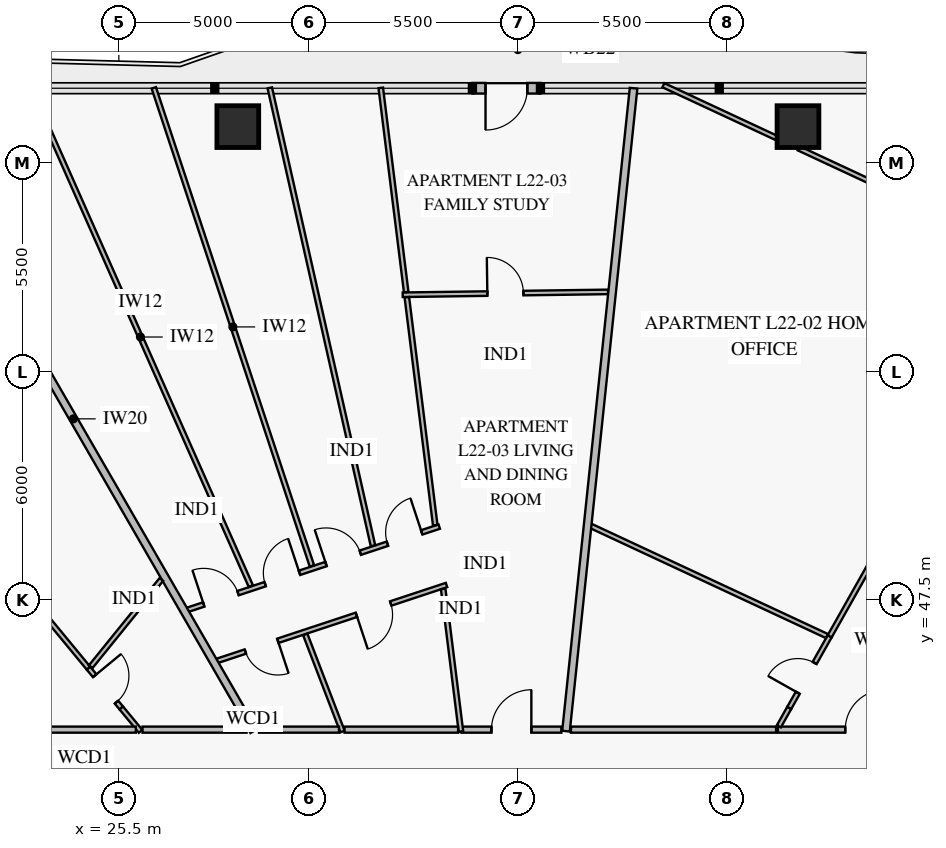
"""IFC4 building model, lengths in metres.
Left out: names, types, materials, properties, quantities, classifications, styles, units other than length and angle.
Written with IfcOpenShell. Run it as: python <this file> out.ifc"""

import sys

from ifc_helpers import new_model, si_unit, direction, frame, frame_2d, origin, origin_2d, place, context, subcontext, project, spatial, rectangle, extrude, element, fill, save


model = new_model("IFC4")
c1 = context("Model", 3, precision=1e-05, world=origin(), true_north=direction((0.0, 1.0)))
c2 = subcontext(c1, "Body", "Model", "MODEL_VIEW")
j1 = project(units=[si_unit("LENGTHUNIT", "METRE"), si_unit("PLANEANGLEUNIT", "RADIAN")], contexts=[c1])
p1 = place(None, origin())
s1 = spatial("IfcSite", under=j1, at=p1, CompositionType="ELEMENT")
p2 = place(p1, origin())
s2 = spatial("IfcBuilding", under=s1, at=p2, CompositionType="ELEMENT")
p3 = place(p2, frame((0.0, 0.0, 92.4)))
s3 = spatial("IfcBuildingStorey", under=s2, at=p3, CompositionType="ELEMENT", Elevation=92.4)
for number, where, z_axis, x_axis in (
    (1, (43.37, 59.948, 0.0), (0.0, 0.0, 1.0), (-1.0, 0.0, 0.0)),
    (2, (28.63, 59.948, 0.0), (0.0, 0.0, 1.0), (-1.0, 0.0, 0.0)),
):
    element("IfcColumn", number, at=place(p3, frame(where, z_axis=z_axis, x_axis=x_axis)), inside=s3, PredefinedType="COLUMN", context=c2, shape_type="SweptSolid", body=[
        extrude(rectangle(XDim=1.1, YDim=1.1, at=origin_2d()), origin(), (0.0, 0.0, 1.0), 3.55),
    ])
p4 = place(p3, frame((34.803, 60.958, 0.0), z_axis=(0.0, 0.0, 1.0), x_axis=(1.0, 0.0, 0.0)))
e3 = element("IfcWall", 3, at=p4, inside=s3, PredefinedType="SOLIDWALL", context=c2, shape_type="SweptSolid", body=[
    extrude(rectangle(XDim=1.79, YDim=0.28, at=frame_2d((0.895, 0.0))), origin(), (0.0, 0.0, 1.0), 3.55),
])
p5 = place(p4, frame((0.345, 0.0, 0.0)))
e4 = element("IfcOpeningElement", 4, at=p5, cuts=e3, PredefinedType="OPENING", context=c2, shape_type="SweptSolid", body=[
    extrude(rectangle(XDim=1.1, YDim=2.2, at=frame_2d((0.55, 1.1))), frame((0.0, 0.152, 0.0), z_axis=(0.0, -1.0, 0.0), x_axis=(1.0, 0.0, 0.0)), (0.0, 0.0, 1.0), 0.304),
])
p6 = place(p3, frame((43.139, 44.65, 0.0), z_axis=(0.0, 0.0, 1.0), x_axis=(0.491544748093, 0.870852318492, 0.0)))
e5 = element("IfcWall", 5, at=p6, inside=s3, PredefinedType="PARTITIONING", context=c2, shape_type="SweptSolid", body=[
    extrude(rectangle(XDim=2.167, YDim=0.12, at=frame_2d((1.083, 0.0))), origin(), (0.0, 0.0, 1.0), 3.55),
])
p7 = place(p6, frame((0.46, 0.0, 0.0)))
e6 = element("IfcOpeningElement", 6, at=p7, cuts=e5, PredefinedType="OPENING", context=c2, shape_type="SweptSolid", body=[
    extrude(rectangle(XDim=0.9, YDim=2.1, at=frame_2d((0.45, 1.05))), frame((0.0, 0.072, 0.0), z_axis=(0.0, -1.0, 0.0), x_axis=(1.0, 0.0, 0.0)), (0.0, 0.0, 1.0), 0.144),
])
p8 = place(p3, frame((44.204, 46.537, 0.0), z_axis=(0.0, 0.0, 1.0), x_axis=(0.491507930141, 0.870873099027, 0.0)))
e7 = element("IfcWall", 7, at=p8, inside=s3, PredefinedType="PARTITIONING", context=c2, shape_type="SweptSolid", body=[
    extrude(rectangle(XDim=10.019, YDim=0.12, at=frame_2d((5.009, 0.0))), origin(), (0.0, 0.0, 1.0), 3.1),
])
p9 = place(p8, frame((5.176, 0.0, 0.0)))
e8 = element("IfcOpeningElement", 8, at=p9, cuts=e7, PredefinedType="OPENING", context=c2, shape_type="SweptSolid", body=[
    extrude(rectangle(XDim=0.95, YDim=2.1, at=frame_2d((0.475, 1.05))), frame((0.0, 0.072, 0.0), z_axis=(0.0, -1.0, 0.0), x_axis=(1.0, 0.0, 0.0)), (0.0, 0.0, 1.0), 0.144),
])
p10 = place(p3, frame((49.71, 56.43, 0.0), z_axis=(0.0, 0.0, 1.0), x_axis=(-0.906320781417, 0.422590394084, 0.0)))
e9 = element("IfcWall", 9, at=p10, inside=s3, PredefinedType="PARTITIONING", context=c2, shape_type="SweptSolid", body=[
    extrude(rectangle(XDim=6.976, YDim=0.12, at=frame_2d((3.488, 0.0))), origin(), (0.0, 0.0, 1.0), 2.8),
])
p11 = place(p10, frame((2.929, 0.0, 0.0)))
e10 = element("IfcOpeningElement", 10, at=p11, cuts=e9, PredefinedType="OPENING", context=c2, shape_type="SweptSolid", body=[
    extrude(rectangle(XDim=0.95, YDim=2.1, at=frame_2d((0.475, 1.05))), frame((0.0, 0.072, 0.0), z_axis=(0.0, -1.0, 0.0), x_axis=(1.0, 0.0, 0.0)), (0.0, 0.0, 1.0), 0.144),
])
p12 = place(p3, frame((47.436, 44.08, 0.0), z_axis=(0.0, 0.0, 1.0), x_axis=(-1.0, 0.0, 0.0)))
e11 = element("IfcWall", 11, at=p12, inside=s3, PredefinedType="PARTITIONING", context=c2, shape_type="SweptSolid", body=[
    extrude(rectangle(XDim=4.595, YDim=0.16, at=frame_2d((2.297, 0.0))), origin(), (0.0, 0.0, 1.0), 3.55),
])
p13 = place(p12, frame((1.772, 0.0, 0.0)))
e12 = element("IfcOpeningElement", 12, at=p13, cuts=e11, PredefinedType="OPENING", context=c2, shape_type="SweptSolid", body=[
    extrude(rectangle(XDim=1.05, YDim=2.15, at=frame_2d((0.525, 1.075))), frame((0.0, 0.092, 0.0), z_axis=(0.0, -1.0, 0.0), x_axis=(1.0, 0.0, 0.0)), (0.0, 0.0, 1.0), 0.184),
])
p14 = place(p3, frame((38.373, 55.6, 0.0), z_axis=(0.0, 0.0, 1.0), x_axis=(-0.999902567538, -0.01395906268, 0.0)))
e13 = element("IfcWall", 13, at=p14, inside=s3, PredefinedType="PARTITIONING", context=c2, shape_type="SweptSolid", body=[
    extrude(rectangle(XDim=5.404, YDim=0.12, at=frame_2d((2.702, 0.0))), origin(), (0.0, 0.0, 1.0), 3.55),
])
p15 = place(p14, frame((2.227, 0.0, 0.0)))
e14 = element("IfcOpeningElement", 14, at=p15, cuts=e13, PredefinedType="OPENING", context=c2, shape_type="SweptSolid", body=[
    extrude(rectangle(XDim=0.95, YDim=2.1, at=frame_2d((0.475, 1.05))), frame((0.0, 0.072, 0.0), z_axis=(0.0, -1.0, 0.0), x_axis=(1.0, 0.0, 0.0)), (0.0, 0.0, 1.0), 0.144),
])
p16 = place(p3, frame((34.122, 47.885, 0.0), z_axis=(0.0, 0.0, 1.0), x_axis=(-0.949423400421, -0.313998736834, 0.0)))
e15 = element("IfcWall", 15, at=p16, inside=s3, PredefinedType="PARTITIONING", context=c2, shape_type="SweptSolid", body=[
    extrude(rectangle(XDim=6.41, YDim=0.12, at=frame_2d((3.205, 0.0))), origin(), (0.0, 0.0, 1.0), 2.85),
])
p17 = place(p16, frame((1.546, 0.0, 0.0)))
e16 = element("IfcOpeningElement", 16, at=p17, cuts=e15, PredefinedType="OPENING", context=c2, shape_type="SweptSolid", body=[
    extrude(rectangle(XDim=0.95, YDim=2.1, at=frame_2d((0.475, 1.05))), frame((0.0, 0.072, 0.0), z_axis=(0.0, -1.0, 0.0), x_axis=(1.0, 0.0, 0.0)), (0.0, 0.0, 1.0), 0.144),
])
p18 = place(p16, frame((4.674, 0.0, 0.0)))
e17 = element("IfcOpeningElement", 17, at=p18, cuts=e15, PredefinedType="OPENING", context=c2, shape_type="SweptSolid", body=[
    extrude(rectangle(XDim=0.9, YDim=2.1, at=frame_2d((0.45, 1.05))), frame((0.0, 0.072, 0.0), z_axis=(0.0, -1.0, 0.0), x_axis=(1.0, 0.0, 0.0)), (0.0, 0.0, 1.0), 0.144),
])
p19 = place(p3, frame((33.931, 49.423, 0.0), z_axis=(0.0, 0.0, 1.0), x_axis=(-0.949429209045, -0.313981173023, 0.0)))
e18 = element("IfcWall", 18, at=p19, inside=s3, PredefinedType="PARTITIONING", context=c2, shape_type="SweptSolid", body=[
    extrude(rectangle(XDim=7.012, YDim=0.12, at=frame_2d((3.506, 0.0))), origin(), (0.0, 0.0, 1.0), 2.85),
])
p20 = place(p19, frame((0.485, 0.0, 0.0)))
e19 = element("IfcOpeningElement", 19, at=p20, cuts=e18, PredefinedType="OPENING", context=c2, shape_type="SweptSolid", body=[
    extrude(rectangle(XDim=0.95, YDim=2.1, at=frame_2d((0.475, 1.05))), frame((0.0, 0.072, 0.0), z_axis=(0.0, -1.0, 0.0), x_axis=(1.0, 0.0, 0.0)), (0.0, 0.0, 1.0), 0.144),
])
p21 = place(p19, frame((2.188, 0.0, 0.0)))
e20 = element("IfcOpeningElement", 20, at=p21, cuts=e18, PredefinedType="OPENING", context=c2, shape_type="SweptSolid", body=[
    extrude(rectangle(XDim=0.95, YDim=2.1, at=frame_2d((0.475, 1.05))), frame((0.0, 0.072, 0.0), z_axis=(0.0, -1.0, 0.0), x_axis=(1.0, 0.0, 0.0)), (0.0, 0.0, 1.0), 0.144),
])
p22 = place(p19, frame((3.874, 0.0, 0.0)))
e21 = element("IfcOpeningElement", 21, at=p22, cuts=e18, PredefinedType="OPENING", context=c2, shape_type="SweptSolid", body=[
    extrude(rectangle(XDim=0.95, YDim=2.1, at=frame_2d((0.475, 1.05))), frame((0.0, 0.072, 0.0), z_axis=(0.0, -1.0, 0.0), x_axis=(1.0, 0.0, 0.0)), (0.0, 0.0, 1.0), 0.144),
])
p23 = place(p19, frame((5.577, 0.0, 0.0)))
e22 = element("IfcOpeningElement", 22, at=p23, cuts=e18, PredefinedType="OPENING", context=c2, shape_type="SweptSolid", body=[
    extrude(rectangle(XDim=0.95, YDim=2.1, at=frame_2d((0.475, 1.05))), frame((0.0, 0.072, 0.0), z_axis=(0.0, -1.0, 0.0), x_axis=(1.0, 0.0, 0.0)), (0.0, 0.0, 1.0), 0.144),
])
p24 = place(p3, frame((37.143, 44.08, 0.0), z_axis=(0.0, 0.0, 1.0), x_axis=(-1.0, 0.0, 0.0)))
e23 = element("IfcWall", 23, at=p24, inside=s3, PredefinedType="PARTITIONING", context=c2, shape_type="SweptSolid", body=[
    extrude(rectangle(XDim=2.628, YDim=0.16, at=frame_2d((1.314, 0.0))), origin(), (0.0, 0.0, 1.0), 3.55),
])
p25 = place(p24, frame((0.789, 0.0, 0.0)))
e24 = element("IfcOpeningElement", 24, at=p25, cuts=e23, PredefinedType="OPENING", context=c2, shape_type="SweptSolid", body=[
    extrude(rectangle(XDim=1.05, YDim=2.15, at=frame_2d((0.525, 1.075))), frame((0.0, 0.092, 0.0), z_axis=(0.0, -1.0, 0.0), x_axis=(1.0, 0.0, 0.0)), (0.0, 0.0, 1.0), 0.184),
])
p26 = place(p3, frame((25.565, 44.65, 0.0), z_axis=(0.0, 0.0, 1.0), x_axis=(-0.636278938951, 0.771459079827, 0.0)))
e25 = element("IfcWall", 25, at=p26, inside=s3, PredefinedType="PARTITIONING", context=c2, shape_type="SweptSolid", body=[
    extrude(rectangle(XDim=1.362, YDim=0.12, at=frame_2d((0.681, 0.0))), origin(), (0.0, 0.0, 1.0), 3.55),
])
p27 = place(p26, frame((0.2, 0.0, 0.0)))
e26 = element("IfcOpeningElement", 26, at=p27, cuts=e25, PredefinedType="OPENING", context=c2, shape_type="SweptSolid", body=[
    extrude(rectangle(XDim=0.9, YDim=2.1, at=frame_2d((0.45, 1.05))), frame((0.0, 0.072, 0.0), z_axis=(0.0, -1.0, 0.0), x_axis=(1.0, 0.0, 0.0)), (0.0, 0.0, 1.0), 0.144),
])
p28 = place(p3, frame((24.698, 45.7, 0.0), z_axis=(0.0, 0.0, 1.0), x_axis=(-0.636404893794, 0.771355178342, 0.0)))
e27 = element("IfcWall", 27, at=p28, inside=s3, PredefinedType="PARTITIONING", context=c2, shape_type="SweptSolid", body=[
    extrude(rectangle(XDim=2.317, YDim=0.12, at=frame_2d((1.159, 0.0))), origin(), (0.0, 0.0, 1.0), 3.55),
])
p29 = place(p3, frame((42.867, 44.168, 0.0), z_axis=(0.0, 0.0, 1.0), x_axis=(0.491475647569, 0.870891318045, 0.0)))
e28 = element("IfcWall", 28, at=p29, inside=s3, PredefinedType="PARTITIONING", context=c2, shape_type="SweptSolid", body=[
    extrude(rectangle(XDim=0.553, YDim=0.12, at=frame_2d((0.277, 0.0))), origin(), (0.0, 0.0, 1.0), 3.55),
])
p30 = place(p3, frame((44.13, 46.543, 0.0), z_axis=(0.0, 0.0, 1.0), x_axis=(-0.90630173442, 0.422631241376, 0.0)))
e29 = element("IfcWall", 29, at=p30, inside=s3, PredefinedType="PARTITIONING", context=c2, shape_type="SweptSolid", body=[
    extrude(rectangle(XDim=6.887, YDim=0.12, at=frame_2d((3.444, 0.0))), origin(), (0.0, 0.0, 1.0), 2.85),
])
p31 = place(p3, frame((42.8, 59.653, 0.0), z_axis=(0.0, 0.0, 1.0), x_axis=(-0.906316219076, 0.422600178702, 0.0)))
e30 = element("IfcWall", 30, at=p31, inside=s3, PredefinedType="PARTITIONING", context=c2, shape_type="SweptSolid", body=[
    extrude(rectangle(XDim=3.28, YDim=0.12, at=frame_2d((1.64, 0.0))), origin(), (0.0, 0.0, 1.0), 2.8),
])
p32 = place(p3, frame((37.265, 44.04, 0.0), z_axis=(0.0, 0.0, 1.0), x_axis=(0.104535371824, 0.994521169226, 0.0)))
e31 = element("IfcWall", 31, at=p32, inside=s3, PredefinedType="PARTITIONING", context=c2, shape_type="SweptSolid", body=[
    extrude(rectangle(XDim=17.012, YDim=0.2, at=frame_2d((8.506, 0.0))), origin(), (0.0, 0.0, 1.0), 2.8),
])
p33 = place(p3, frame((31.385, 44.03, 0.0), z_axis=(0.0, 0.0, 1.0), x_axis=(-0.35815382697, 0.933662592282, 0.0)))
e32 = element("IfcWall", 32, at=p33, inside=s3, PredefinedType="PARTITIONING", context=c2, shape_type="SweptSolid", body=[
    extrude(rectangle(XDim=2.736, YDim=0.12, at=frame_2d((1.368, 0.0))), origin(), (0.0, 0.0, 1.0), 3.55),
])
p34 = place(p3, frame((32.188, 48.918, 0.0), z_axis=(0.0, 0.0, 1.0), x_axis=(-0.2198592635, 0.975531600848, 0.0)))
e33 = element("IfcWall", 33, at=p34, inside=s3, PredefinedType="PARTITIONING", context=c2, shape_type="SweptSolid", body=[
    extrude(rectangle(XDim=12.353, YDim=0.12, at=frame_2d((6.176, 0.0))), origin(), (0.0, 0.0, 1.0), 2.8),
])
p35 = place(p3, frame((30.581, 48.387, 0.0), z_axis=(0.0, 0.0, 1.0), x_axis=(-0.31398296165, 0.949428617534, 0.0)))
e34 = element("IfcWall", 34, at=p35, inside=s3, PredefinedType="PARTITIONING", context=c2, shape_type="SweptSolid", body=[
    extrude(rectangle(XDim=13.252, YDim=0.12, at=frame_2d((6.626, 0.0))), origin(), (0.0, 0.0, 1.0), 2.8),
])
p36 = place(p3, frame((28.974, 47.855, 0.0), z_axis=(0.0, 0.0, 1.0), x_axis=(-0.405149568186, 0.91425041832, 0.0)))
e35 = element("IfcWall", 35, at=p36, inside=s3, PredefinedType="PARTITIONING", context=c2, shape_type="SweptSolid", body=[
    extrude(rectangle(XDim=14.343, YDim=0.12, at=frame_2d((7.171, 0.0))), origin(), (0.0, 0.0, 1.0), 2.8),
])
p37 = place(p3, frame((34.502, 44.03, 0.0), z_axis=(0.0, 0.0, 1.0), x_axis=(-0.123637622929, 0.992327434971, 0.0)))
e36 = element("IfcWall", 36, at=p37, inside=s3, PredefinedType="PARTITIONING", context=c2, shape_type="SweptSolid", body=[
    extrude(rectangle(XDim=3.783, YDim=0.12, at=frame_2d((1.892, 0.0))), origin(), (0.0, 0.0, 1.0), 3.55),
])
p38 = place(p3, frame((33.825, 49.46, 0.0), z_axis=(0.0, 0.0, 1.0), x_axis=(-0.123607162853, 0.992331229626, 0.0)))
e37 = element("IfcWall", 37, at=p38, inside=s3, PredefinedType="PARTITIONING", context=c2, shape_type="SweptSolid", body=[
    extrude(rectangle(XDim=6.044, YDim=0.12, at=frame_2d((3.022, 0.0))), origin(), (0.0, 0.0, 1.0), 3.1),
])
p39 = place(p3, frame((33.061, 55.594, 0.0), z_axis=(0.0, 0.0, 1.0), x_axis=(-0.12359092377, 0.99233325227, 0.0)))
e38 = element("IfcWall", 38, at=p39, inside=s3, PredefinedType="PARTITIONING", context=c2, shape_type="SweptSolid", body=[
    extrude(rectangle(XDim=5.417, YDim=0.12, at=frame_2d((2.708, 0.0))), origin(), (0.0, 0.0, 1.0), 2.8),
])
p40 = place(p3, frame((29.049, 44.04, 0.0), z_axis=(0.0, 0.0, 1.0), x_axis=(-0.499993398997, 0.866029214842, 0.0)))
e39 = element("IfcWall", 39, at=p40, inside=s3, PredefinedType="PARTITIONING", context=c2, shape_type="SweptSolid", body=[
    extrude(rectangle(XDim=18.98, YDim=0.2, at=frame_2d((9.49, 0.0))), origin(), (0.0, 0.0, 1.0), 2.8),
])
p41 = place(p3, frame((26.072, 44.035, 0.0), z_axis=(0.0, 0.0, 1.0), x_axis=(-0.636351066899, 0.771399584947, 0.0)))
e40 = element("IfcWall", 40, at=p41, inside=s3, PredefinedType="PARTITIONING", context=c2, shape_type="SweptSolid", body=[
    extrude(rectangle(XDim=0.797, YDim=0.12, at=frame_2d((0.398, 0.0))), origin(), (0.0, 0.0, 1.0), 3.55),
])
p42 = place(p3, frame((26.619, 48.033, 0.0), z_axis=(0.0, 0.0, 1.0), x_axis=(-0.629295602894, -0.777166033855, 0.0)))
e41 = element("IfcWall", 41, at=p42, inside=s3, PredefinedType="PARTITIONING", context=c2, shape_type="SweptSolid", body=[
    extrude(rectangle(XDim=2.957, YDim=0.12, at=frame_2d((1.479, 0.0))), origin(), (0.0, 0.0, 1.0), 3.55),
])
p43 = place(p3, frame((42.795, 44.08, 0.0), z_axis=(0.0, 0.0, 1.0), x_axis=(-1.0, 0.0, 0.0)))
e42 = element("IfcWall", 42, at=p43, inside=s3, PredefinedType="PARTITIONING", context=c2, shape_type="SweptSolid", body=[
    extrude(rectangle(XDim=5.398, YDim=0.16, at=frame_2d((2.699, 0.0))), origin(), (0.0, 0.0, 1.0), 2.85),
])
p44 = place(p3, frame((34.427, 44.08, 0.0), z_axis=(0.0, 0.0, 1.0), x_axis=(-1.0, 0.0, 0.0)))
e43 = element("IfcWall", 43, at=p44, inside=s3, PredefinedType="PARTITIONING", context=c2, shape_type="SweptSolid", body=[
    extrude(rectangle(XDim=2.988, YDim=0.16, at=frame_2d((1.494, 0.0))), origin(), (0.0, 0.0, 1.0), 2.85),
])
p45 = place(p3, frame((31.293, 44.08, 0.0), z_axis=(0.0, 0.0, 1.0), x_axis=(-1.0, 0.0, 0.0)))
e44 = element("IfcWall", 44, at=p45, inside=s3, PredefinedType="PARTITIONING", context=c2, shape_type="SweptSolid", body=[
    extrude(rectangle(XDim=2.104, YDim=0.16, at=frame_2d((1.052, 0.0))), origin(), (0.0, 0.0, 1.0), 3.55),
])
p46 = place(p3, frame((25.947, 44.08, 0.0), z_axis=(0.0, 0.0, 1.0), x_axis=(-1.0, 0.0, 0.0)))
e45 = element("IfcWall", 45, at=p46, inside=s3, PredefinedType="PARTITIONING", context=c2, shape_type="SweptSolid", body=[
    extrude(rectangle(XDim=2.847, YDim=0.16, at=frame_2d((1.423, 0.0))), origin(), (0.0, 0.0, 1.0), 2.85),
])
p47 = place(p3, frame((28.861, 44.08, 0.0), z_axis=(0.0, 0.0, 1.0), x_axis=(-1.0, 0.0, 0.0)))
e46 = element("IfcWall", 46, at=p47, inside=s3, PredefinedType="PARTITIONING", context=c2, shape_type="SweptSolid", body=[
    extrude(rectangle(XDim=2.738, YDim=0.16, at=frame_2d((1.369, 0.0))), origin(), (0.0, 0.0, 1.0), 3.55),
])
p48 = place(p5, frame((1.1, 0.0, 0.0), z_axis=(0.0, 0.0, 1.0), x_axis=(-1.0, 0.0, 0.0)))
e47 = element("IfcDoor", 47, at=p48, inside=s3, OperationType="SINGLE_SWING_RIGHT", PredefinedType="DOOR", context=c2, shape_type="SweptSolid", body=[
    extrude(rectangle(XDim=1.1, YDim=2.2, at=frame_2d((0.55, 1.1))), frame((0.0, 0.025, 0.0), z_axis=(0.0, -1.0, 0.0), x_axis=(1.0, 0.0, 0.0)), (0.0, 0.0, 1.0), 0.05),
])
fill(e4, e47)
p49 = place(p7, origin())
e48 = element("IfcDoor", 48, at=p49, inside=s3, OperationType="SINGLE_SWING_LEFT", PredefinedType="DOOR", context=c2, shape_type="SweptSolid", body=[
    extrude(rectangle(XDim=0.9, YDim=2.1, at=frame_2d((0.45, 1.05))), frame((0.0, 0.025, 0.0), z_axis=(0.0, -1.0, 0.0), x_axis=(1.0, 0.0, 0.0)), (0.0, 0.0, 1.0), 0.05),
])
fill(e6, e48)
p50 = place(p13, frame((1.05, 0.0, 0.0), z_axis=(0.0, 0.0, 1.0), x_axis=(-1.0, 0.0, 0.0)))
e49 = element("IfcDoor", 49, at=p50, inside=s3, OperationType="SINGLE_SWING_RIGHT", PredefinedType="DOOR", context=c2, shape_type="SweptSolid", body=[
    extrude(rectangle(XDim=1.05, YDim=2.15, at=frame_2d((0.525, 1.075))), frame((0.0, 0.025, 0.0), z_axis=(0.0, -1.0, 0.0), x_axis=(1.0, 0.0, 0.0)), (0.0, 0.0, 1.0), 0.05),
])
fill(e12, e49)
p51 = place(p15, frame((0.95, 0.0, 0.0), z_axis=(0.0, 0.0, 1.0), x_axis=(-1.0, 0.0, 0.0)))
e50 = element("IfcDoor", 50, at=p51, inside=s3, OperationType="SINGLE_SWING_LEFT", PredefinedType="DOOR", context=c2, shape_type="SweptSolid", body=[
    extrude(rectangle(XDim=0.95, YDim=2.1, at=frame_2d((0.475, 1.05))), frame((0.0, 0.025, 0.0), z_axis=(0.0, -1.0, 0.0), x_axis=(1.0, 0.0, 0.0)), (0.0, 0.0, 1.0), 0.05),
])
fill(e14, e50)
p52 = place(p17, origin())
e51 = element("IfcDoor", 51, at=p52, inside=s3, OperationType="SINGLE_SWING_RIGHT", PredefinedType="DOOR", context=c2, shape_type="SweptSolid", body=[
    extrude(rectangle(XDim=0.95, YDim=2.1, at=frame_2d((0.475, 1.05))), frame((0.0, 0.025, 0.0), z_axis=(0.0, -1.0, 0.0), x_axis=(1.0, 0.0, 0.0)), (0.0, 0.0, 1.0), 0.05),
])
fill(e16, e51)
p53 = place(p18, origin())
e52 = element("IfcDoor", 52, at=p53, inside=s3, OperationType="SINGLE_SWING_LEFT", PredefinedType="DOOR", context=c2, shape_type="SweptSolid", body=[
    extrude(rectangle(XDim=0.9, YDim=2.1, at=frame_2d((0.45, 1.05))), frame((0.0, 0.025, 0.0), z_axis=(0.0, -1.0, 0.0), x_axis=(1.0, 0.0, 0.0)), (0.0, 0.0, 1.0), 0.05),
])
fill(e17, e52)
p54 = place(p20, frame((0.95, 0.0, 0.0), z_axis=(0.0, 0.0, 1.0), x_axis=(-1.0, 0.0, 0.0)))
e53 = element("IfcDoor", 53, at=p54, inside=s3, OperationType="SINGLE_SWING_RIGHT", PredefinedType="DOOR", context=c2, shape_type="SweptSolid", body=[
    extrude(rectangle(XDim=0.95, YDim=2.1, at=frame_2d((0.475, 1.05))), frame((0.0, 0.025, 0.0), z_axis=(0.0, -1.0, 0.0), x_axis=(1.0, 0.0, 0.0)), (0.0, 0.0, 1.0), 0.05),
])
fill(e19, e53)
p55 = place(p21, frame((0.95, 0.0, 0.0), z_axis=(0.0, 0.0, 1.0), x_axis=(-1.0, 0.0, 0.0)))
e54 = element("IfcDoor", 54, at=p55, inside=s3, OperationType="SINGLE_SWING_LEFT", PredefinedType="DOOR", context=c2, shape_type="SweptSolid", body=[
    extrude(rectangle(XDim=0.95, YDim=2.1, at=frame_2d((0.475, 1.05))), frame((0.0, 0.025, 0.0), z_axis=(0.0, -1.0, 0.0), x_axis=(1.0, 0.0, 0.0)), (0.0, 0.0, 1.0), 0.05),
])
fill(e20, e54)
p56 = place(p22, frame((0.95, 0.0, 0.0), z_axis=(0.0, 0.0, 1.0), x_axis=(-1.0, 0.0, 0.0)))
e55 = element("IfcDoor", 55, at=p56, inside=s3, OperationType="SINGLE_SWING_RIGHT", PredefinedType="DOOR", context=c2, shape_type="SweptSolid", body=[
    extrude(rectangle(XDim=0.95, YDim=2.1, at=frame_2d((0.475, 1.05))), frame((0.0, 0.025, 0.0), z_axis=(0.0, -1.0, 0.0), x_axis=(1.0, 0.0, 0.0)), (0.0, 0.0, 1.0), 0.05),
])
fill(e21, e55)
p57 = place(p23, frame((0.95, 0.0, 0.0), z_axis=(0.0, 0.0, 1.0), x_axis=(-1.0, 0.0, 0.0)))
e56 = element("IfcDoor", 56, at=p57, inside=s3, OperationType="SINGLE_SWING_LEFT", PredefinedType="DOOR", context=c2, shape_type="SweptSolid", body=[
    extrude(rectangle(XDim=0.95, YDim=2.1, at=frame_2d((0.475, 1.05))), frame((0.0, 0.025, 0.0), z_axis=(0.0, -1.0, 0.0), x_axis=(1.0, 0.0, 0.0)), (0.0, 0.0, 1.0), 0.05),
])
fill(e22, e56)
p58 = place(p25, frame((1.05, 0.0, 0.0), z_axis=(0.0, 0.0, 1.0), x_axis=(-1.0, 0.0, 0.0)))
e57 = element("IfcDoor", 57, at=p58, inside=s3, OperationType="SINGLE_SWING_RIGHT", PredefinedType="DOOR", context=c2, shape_type="SweptSolid", body=[
    extrude(rectangle(XDim=1.05, YDim=2.15, at=frame_2d((0.525, 1.075))), frame((0.0, 0.025, 0.0), z_axis=(0.0, -1.0, 0.0), x_axis=(1.0, 0.0, 0.0)), (0.0, 0.0, 1.0), 0.05),
])
fill(e24, e57)
p59 = place(p27, frame((0.9, 0.0, 0.0), z_axis=(0.0, 0.0, 1.0), x_axis=(-1.0, 0.0, 0.0)))
e58 = element("IfcDoor", 58, at=p59, inside=s3, OperationType="SINGLE_SWING_LEFT", PredefinedType="DOOR", context=c2, shape_type="SweptSolid", body=[
    extrude(rectangle(XDim=0.9, YDim=2.1, at=frame_2d((0.45, 1.05))), frame((0.0, 0.025, 0.0), z_axis=(0.0, -1.0, 0.0), x_axis=(1.0, 0.0, 0.0)), (0.0, 0.0, 1.0), 0.05),
])
fill(e26, e58)
save(model, sys.argv[1])
